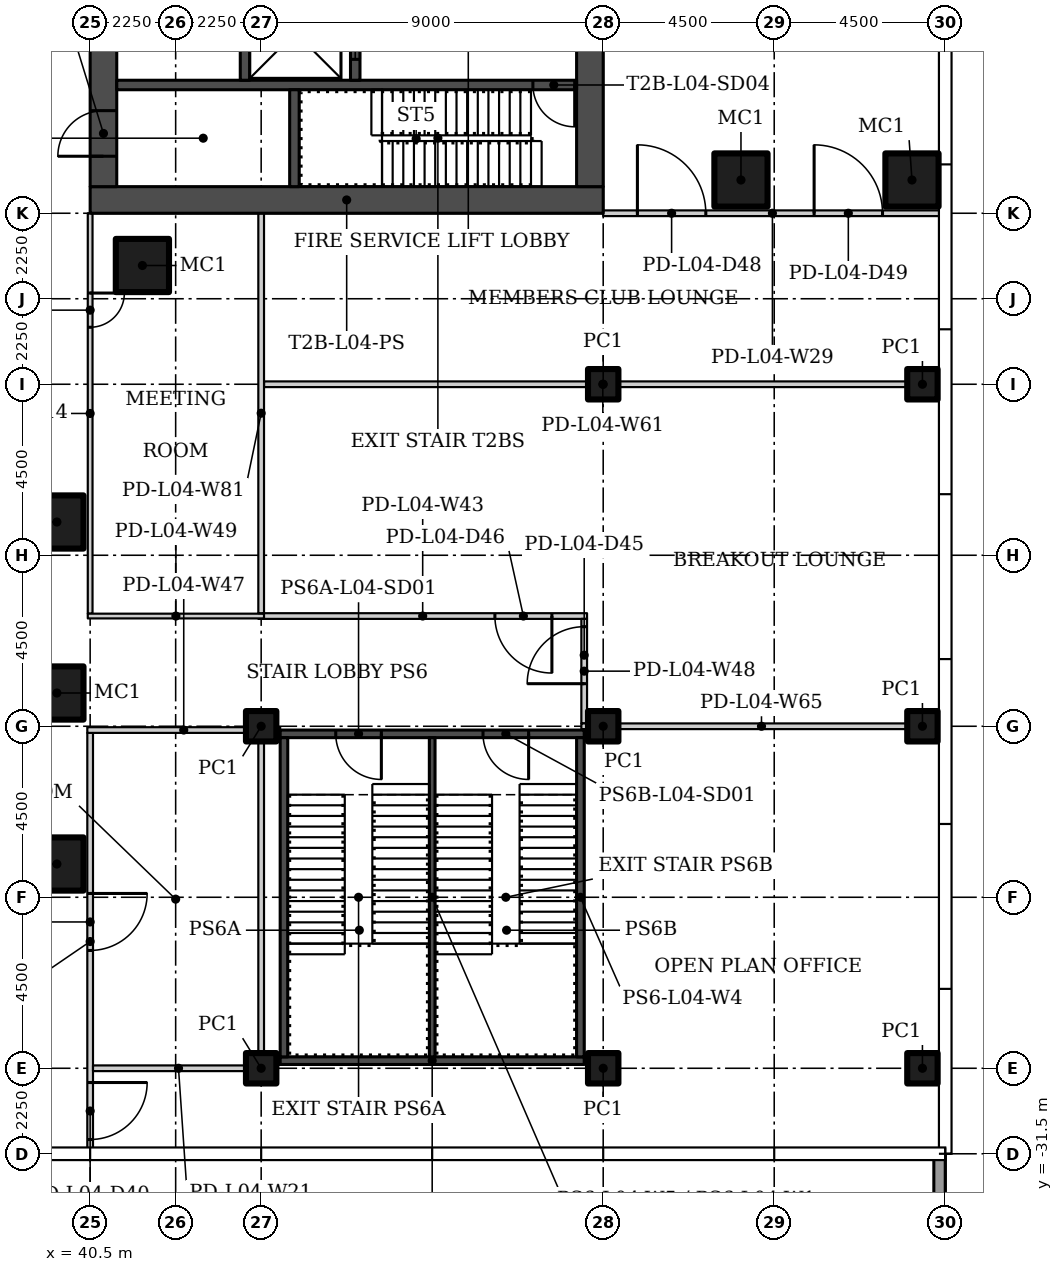
"""IFC4 building model, lengths in metres.
Left out: names, types, materials, properties, quantities, classifications, styles, units other than length and angle.
Written with IfcOpenShell. Run it as: python <this file> out.ifc"""

import sys

from ifc_helpers import new_model, si_unit, direction, frame, frame_2d, origin, origin_2d, place, context, subcontext, project, spatial, rectangle, hollow_rectangle, extrude, element, fill, save


model = new_model("IFC4")
c1 = context("Model", 3, precision=1e-05, world=origin(), true_north=direction((0.0, 1.0)))
c2 = subcontext(c1, "Body", "Model", "MODEL_VIEW")
j1 = project(units=[si_unit("LENGTHUNIT", "METRE"), si_unit("PLANEANGLEUNIT", "RADIAN")], contexts=[c1])
p1 = place(None, origin())
s1 = spatial("IfcSite", under=j1, at=p1, CompositionType="ELEMENT")
p2 = place(p1, origin())
s2 = spatial("IfcBuilding", under=s1, at=p2, CompositionType="ELEMENT")
p3 = place(p2, frame((0.0, 0.0, 23.5)))
s3 = spatial("IfcBuildingStorey", under=s2, at=p3, CompositionType="ELEMENT", Elevation=23.5)
for number, where in (
    (1, (41.875, -8.125, 0.0)),
    (2, (39.625, -14.875, 0.0)),
    (3, (39.625, -19.375, 0.0)),
    (4, (39.625, -23.875, 0.0)),
    (5, (57.625, -5.875, 0.0)),
    (6, (62.125, -5.875, 0.0)),
):
    element("IfcColumn", number, at=place(p3, frame(where)), inside=s3, PredefinedType="COLUMN", context=c2, shape_type="SweptSolid", body=[
        extrude(hollow_rectangle(XDim=1.4, YDim=1.4, WallThickness=0.06, at=origin_2d()), origin(), (0.0, 0.0, 1.0), 4.65),
    ])
for number, where in (
    (7, (45.0, -29.25, 0.0)),
    (8, (45.0, -20.25, 0.0)),
    (9, (54.0, -29.25, 0.0)),
    (10, (54.0, -20.25, 0.0)),
    (11, (54.0, -11.25, 0.0)),
    (12, (62.4, -29.25, 0.0)),
    (13, (62.4, -20.25, 0.0)),
    (14, (62.4, -11.25, 0.0)),
):
    element("IfcColumn", number, at=place(p3, frame(where)), inside=s3, PredefinedType="COLUMN", context=c2, shape_type="SweptSolid", body=[
        extrude(hollow_rectangle(XDim=0.8, YDim=0.8, WallThickness=0.03, at=origin_2d()), origin(), (0.0, 0.0, 1.0), 4.65),
    ])
p4 = place(p3, frame((40.5, -20.425, 0.0), z_axis=(0.0, 0.0, 1.0), x_axis=(0.0, -1.0, 0.0)))
e15 = element("IfcWall", 15, at=p4, inside=s3, PredefinedType="PARTITIONING", context=c2, shape_type="SweptSolid", body=[
    extrude(rectangle(XDim=10.98, YDim=0.15, at=frame_2d((5.49, 0.0))), origin(), (0.0, 0.0, 1.0), 4.65),
])
p5 = place(p4, frame((4.225, 0.0, 0.0)))
e16 = element("IfcOpeningElement", 16, at=p5, cuts=e15, PredefinedType="OPENING", context=c2, shape_type="SweptSolid", body=[
    extrude(rectangle(XDim=1.5, YDim=2.1, at=frame_2d((0.75, 1.05))), frame((0.0, 0.085, 0.0), z_axis=(0.0, -1.0, 0.0), x_axis=(1.0, 0.0, 0.0)), (0.0, 0.0, 1.0), 0.17),
])
p6 = place(p4, frame((9.2, 0.0, 0.0)))
e17 = element("IfcOpeningElement", 17, at=p6, cuts=e15, PredefinedType="OPENING", context=c2, shape_type="SweptSolid", body=[
    extrude(rectangle(XDim=1.5, YDim=2.1, at=frame_2d((0.75, 1.05))), frame((0.0, 0.085, 0.0), z_axis=(0.0, -1.0, 0.0), x_axis=(1.0, 0.0, 0.0)), (0.0, 0.0, 1.0), 0.17),
])
p7 = place(p3, frame((40.5, -6.75, 0.0), z_axis=(0.0, 0.0, 1.0), x_axis=(0.0, -1.0, 0.0)))
e18 = element("IfcWall", 18, at=p7, inside=s3, PredefinedType="PARTITIONING", context=c2, shape_type="SweptSolid", body=[
    extrude(rectangle(XDim=10.537, YDim=0.125, at=frame_2d((5.269, 0.0))), origin(), (0.0, 0.0, 1.0), 4.65),
])
p8 = place(p7, frame((2.1, 0.0, 0.0)))
e19 = element("IfcOpeningElement", 19, at=p8, cuts=e18, PredefinedType="OPENING", context=c2, shape_type="SweptSolid", body=[
    extrude(rectangle(XDim=0.9, YDim=2.1, at=frame_2d((0.45, 1.05))), frame((0.0, 0.073, 0.0), z_axis=(0.0, -1.0, 0.0), x_axis=(1.0, 0.0, 0.0)), (0.0, 0.0, 1.0), 0.145),
])
p9 = place(p3, frame((45.075, -29.25, 0.0), z_axis=(0.0, 0.0, 1.0), x_axis=(-1.0, 0.0, 0.0)))
e20 = element("IfcWall", 20, at=p9, inside=s3, PredefinedType="PARTITIONING", context=c2, shape_type="SweptSolid", body=[
    extrude(rectangle(XDim=4.5, YDim=0.15, at=frame_2d((2.25, 0.0))), origin(), (0.0, 0.0, 1.0), 4.65),
])
p10 = place(p3, frame((54.0, -6.75, 0.0)))
e21 = element("IfcWall", 21, at=p10, inside=s3, PredefinedType="PARTITIONING", context=c2, shape_type="SweptSolid", body=[
    extrude(rectangle(XDim=8.905, YDim=0.15, at=frame_2d((4.453, 0.0))), origin(), (0.0, 0.0, 1.0), 4.65),
])
p11 = place(p10, frame((0.9, 0.0, 0.0)))
e22 = element("IfcOpeningElement", 22, at=p11, cuts=e21, PredefinedType="OPENING", context=c2, shape_type="SweptSolid", body=[
    extrude(rectangle(XDim=1.8, YDim=2.4, at=frame_2d((0.9, 1.2))), frame((0.0, 0.085, 0.0), z_axis=(0.0, -1.0, 0.0), x_axis=(1.0, 0.0, 0.0)), (0.0, 0.0, 1.0), 0.17),
])
p12 = place(p10, frame((5.55, 0.0, 0.0)))
e23 = element("IfcOpeningElement", 23, at=p12, cuts=e21, PredefinedType="OPENING", context=c2, shape_type="SweptSolid", body=[
    extrude(rectangle(XDim=1.8, YDim=2.4, at=frame_2d((0.9, 1.2))), frame((0.0, 0.085, 0.0), z_axis=(0.0, -1.0, 0.0), x_axis=(1.0, 0.0, 0.0)), (0.0, 0.0, 1.0), 0.17),
])
p13 = place(p3, frame((53.575, -17.35, 0.0), z_axis=(0.0, 0.0, 1.0), x_axis=(-1.0, 0.0, 0.0)))
e24 = element("IfcWall", 24, at=p13, inside=s3, PredefinedType="PARTITIONING", context=c2, shape_type="SweptSolid", body=[
    extrude(rectangle(XDim=8.65, YDim=0.15, at=frame_2d((4.325, 0.0))), origin(), (0.0, 0.0, 1.0), 4.65),
])
p14 = place(p13, frame((0.925, 0.0, 0.0)))
e25 = element("IfcOpeningElement", 25, at=p14, cuts=e24, PredefinedType="OPENING", context=c2, shape_type="SweptSolid", body=[
    extrude(rectangle(XDim=1.5, YDim=2.1, at=frame_2d((0.75, 1.05))), frame((0.0, 0.085, 0.0), z_axis=(0.0, -1.0, 0.0), x_axis=(1.0, 0.0, 0.0)), (0.0, 0.0, 1.0), 0.17),
])
p15 = place(p3, frame((45.5, -20.35, 0.0), z_axis=(0.0, 0.0, 1.0), x_axis=(-1.0, 0.0, 0.0)))
e26 = element("IfcWall", 26, at=p15, inside=s3, PredefinedType="PARTITIONING", context=c2, shape_type="SweptSolid", body=[
    extrude(rectangle(XDim=5.075, YDim=0.15, at=frame_2d((2.538, 0.0))), origin(), (0.0, 0.0, 1.0), 4.65),
])
p16 = place(p3, frame((53.5, -20.175, 0.0), z_axis=(0.0, 0.0, 1.0), x_axis=(0.0, 1.0, 0.0)))
e27 = element("IfcWall", 27, at=p16, inside=s3, PredefinedType="PARTITIONING", context=c2, shape_type="SweptSolid", body=[
    extrude(rectangle(XDim=2.75, YDim=0.15, at=frame_2d((1.375, 0.0))), origin(), (0.0, 0.0, 1.0), 4.65),
])
p17 = place(p16, frame((1.045, 0.0, 0.0)))
e28 = element("IfcOpeningElement", 28, at=p17, cuts=e27, PredefinedType="OPENING", context=c2, shape_type="SweptSolid", body=[
    extrude(rectangle(XDim=1.5, YDim=2.1, at=frame_2d((0.75, 1.05))), frame((0.0, 0.085, 0.0), z_axis=(0.0, -1.0, 0.0), x_axis=(1.0, 0.0, 0.0)), (0.0, 0.0, 1.0), 0.17),
])
p18 = place(p3, frame((40.438, -17.35, 0.0)))
e29 = element("IfcWall", 29, at=p18, inside=s3, PredefinedType="PARTITIONING", context=c2, shape_type="SweptSolid", body=[
    extrude(rectangle(XDim=4.637, YDim=0.125, at=frame_2d((2.319, 0.0))), origin(), (0.0, 0.0, 1.0), 4.65),
])
p19 = place(p3, frame((62.905, -11.25, 0.0), z_axis=(0.0, 0.0, 1.0), x_axis=(-1.0, 0.0, 0.0)))
e30 = element("IfcWall", 30, at=p19, inside=s3, PredefinedType="PARTITIONING", context=c2, shape_type="SweptSolid", body=[
    extrude(rectangle(XDim=17.83, YDim=0.15, at=frame_2d((8.915, 0.0))), origin(), (0.0, 0.0, 1.0), 4.65),
])
p20 = place(p3, frame((62.905, -20.25, 0.0), z_axis=(0.0, 0.0, 1.0), x_axis=(-1.0, 0.0, 0.0)))
e31 = element("IfcWall", 31, at=p20, inside=s3, PredefinedType="PARTITIONING", context=c2, shape_type="SweptSolid", body=[
    extrude(rectangle(XDim=9.48, YDim=0.15, at=frame_2d((4.74, 0.0))), origin(), (0.0, 0.0, 1.0), 4.65),
])
p21 = place(p3, frame((45.0, -6.75, 0.0), z_axis=(0.0, 0.0, 1.0), x_axis=(0.0, -1.0, 0.0)))
e32 = element("IfcWall", 32, at=p21, inside=s3, PredefinedType="PARTITIONING", context=c2, shape_type="SweptSolid", body=[
    extrude(rectangle(XDim=10.525, YDim=0.15, at=frame_2d((5.262, 0.0))), origin(), (0.0, 0.0, 1.0), 4.65),
])
p22 = place(p3, frame((45.0, -20.425, 0.0), z_axis=(0.0, 0.0, 1.0), x_axis=(0.0, -1.0, 0.0)))
e33 = element("IfcWall", 33, at=p22, inside=s3, PredefinedType="PARTITIONING", context=c2, shape_type="SweptSolid", body=[
    extrude(rectangle(XDim=8.75, YDim=0.15, at=frame_2d((4.375, 0.0))), origin(), (0.0, 0.0, 1.0), 4.65),
])
p23 = place(p3, frame((62.85, -33.45, 0.0), z_axis=(0.0, 0.0, 1.0), x_axis=(0.0, 1.0, 0.0)))
e34 = element("IfcWall", 34, at=p23, inside=s3, PredefinedType="PARAPET", context=c2, shape_type="SweptSolid", body=[
    extrude(rectangle(XDim=1.95, YDim=0.3, at=frame_2d((0.975, 0.0))), origin(), (0.0, 0.0, 1.0), 1.1),
])
p24 = place(p3, frame((54.0, -6.4, 0.0), z_axis=(0.0, 0.0, 1.0), x_axis=(-1.0, 0.0, 0.0)))
e35 = element("IfcWall", 35, at=p24, inside=s3, PredefinedType="SHEAR", context=c2, shape_type="SweptSolid", body=[
    extrude(rectangle(XDim=13.5, YDim=0.7, at=frame_2d((6.75, 0.0))), origin(), (0.0, 0.0, 1.0), 4.65),
])
p25 = place(p3, frame((53.65, -6.05, 0.0), z_axis=(0.0, 0.0, 1.0), x_axis=(0.0, 1.0, 0.0)))
e36 = element("IfcWall", 36, at=p25, inside=s3, PredefinedType="SHEAR", context=c2, shape_type="SweptSolid", body=[
    extrude(rectangle(XDim=12.1, YDim=0.7, at=frame_2d((6.05, 0.0))), origin(), (0.0, 0.0, 1.0), 4.65),
])
p26 = place(p25, frame((6.4, 0.0, 0.0)))
e37 = element("IfcOpeningElement", 37, at=p26, cuts=e36, PredefinedType="OPENING", context=c2, shape_type="SweptSolid", body=[
    extrude(rectangle(XDim=1.8, YDim=2.4, at=frame_2d((0.9, 1.2))), frame((0.0, 0.36, 0.0), z_axis=(0.0, -1.0, 0.0), x_axis=(1.0, 0.0, 0.0)), (0.0, 0.0, 1.0), 0.72),
])
p27 = place(p3, frame((40.85, -6.05, 0.0), z_axis=(0.0, 0.0, 1.0), x_axis=(0.0, 1.0, 0.0)))
e38 = element("IfcWall", 38, at=p27, inside=s3, PredefinedType="SHEAR", context=c2, shape_type="SweptSolid", body=[
    extrude(rectangle(XDim=12.1, YDim=0.7, at=frame_2d((6.05, 0.0))), origin(), (0.0, 0.0, 1.0), 4.65),
])
p28 = place(p27, frame((0.8, 0.0, 0.0)))
e39 = element("IfcOpeningElement", 39, at=p28, cuts=e38, PredefinedType="OPENING", context=c2, shape_type="SweptSolid", body=[
    extrude(rectangle(XDim=1.2, YDim=2.1, at=frame_2d((0.6, 1.05))), frame((0.0, 0.36, 0.0), z_axis=(0.0, -1.0, 0.0), x_axis=(1.0, 0.0, 0.0)), (0.0, 0.0, 1.0), 0.72),
])
p29 = place(p27, frame((6.4, 0.0, 0.0)))
e40 = element("IfcOpeningElement", 40, at=p29, cuts=e38, PredefinedType="OPENING", context=c2, shape_type="SweptSolid", body=[
    extrude(rectangle(XDim=1.8, YDim=2.4, at=frame_2d((0.9, 1.2))), frame((0.0, 0.36, 0.0), z_axis=(0.0, -1.0, 0.0), x_axis=(1.0, 0.0, 0.0)), (0.0, 0.0, 1.0), 0.72),
])
p30 = place(p3, frame((53.3, -3.375, 0.0), z_axis=(0.0, 0.0, 1.0), x_axis=(-1.0, 0.0, 0.0)))
e41 = element("IfcWall", 41, at=p30, inside=s3, PredefinedType="SHEAR", context=c2, shape_type="SweptSolid", body=[
    extrude(rectangle(XDim=12.1, YDim=0.25, at=frame_2d((6.05, 0.0))), origin(), (0.0, 0.0, 1.0), 4.65),
])
p31 = place(p30, frame((0.05, 0.0, 0.0)))
e42 = element("IfcOpeningElement", 42, at=p31, cuts=e41, PredefinedType="OPENING", context=c2, shape_type="SweptSolid", body=[
    extrude(rectangle(XDim=1.1, YDim=2.1, at=frame_2d((0.55, 1.05))), frame((0.0, 0.135, 0.0), z_axis=(0.0, -1.0, 0.0), x_axis=(1.0, 0.0, 0.0)), (0.0, 0.0, 1.0), 0.27),
])
p32 = place(p3, frame((45.875, -6.05, 0.0), z_axis=(0.0, 0.0, 1.0), x_axis=(0.0, 1.0, 0.0)))
e43 = element("IfcWall", 43, at=p32, inside=s3, PredefinedType="SHEAR", context=c2, shape_type="SweptSolid", body=[
    extrude(rectangle(XDim=2.55, YDim=0.25, at=frame_2d((1.275, 0.0))), origin(), (0.0, 0.0, 1.0), 4.65),
])
p33 = place(p3, frame((47.475, -3.25, 0.0), z_axis=(0.0, 0.0, 1.0), x_axis=(0.0, 1.0, 0.0)))
e44 = element("IfcWall", 44, at=p33, inside=s3, PredefinedType="SHEAR", context=c2, shape_type="SweptSolid", body=[
    extrude(rectangle(XDim=2.5, YDim=0.25, at=frame_2d((1.25, 0.0))), origin(), (0.0, 0.0, 1.0), 4.65),
])
p34 = place(p33, frame((0.55, 0.0, 0.0)))
e45 = element("IfcOpeningElement", 45, at=p34, cuts=e44, PredefinedType="OPENING", context=c2, shape_type="SweptSolid", body=[
    extrude(rectangle(XDim=1.4, YDim=2.4, at=frame_2d((0.7, 1.2))), frame((0.0, 0.135, 0.0), z_axis=(0.0, -1.0, 0.0), x_axis=(1.0, 0.0, 0.0)), (0.0, 0.0, 1.0), 0.27),
])
p35 = place(p3, frame((44.575, -3.25, 0.0), z_axis=(0.0, 0.0, 1.0), x_axis=(0.0, 1.0, 0.0)))
e46 = element("IfcWall", 46, at=p35, inside=s3, PredefinedType="SHEAR", context=c2, shape_type="SweptSolid", body=[
    extrude(rectangle(XDim=2.5, YDim=0.25, at=frame_2d((1.25, 0.0))), origin(), (0.0, 0.0, 1.0), 4.65),
])
p36 = place(p3, frame((53.5, -20.45, 0.0), z_axis=(0.0, 0.0, 1.0), x_axis=(-1.0, 0.0, 0.0)))
e47 = element("IfcWall", 47, at=p36, inside=s3, PredefinedType="SHEAR", context=c2, shape_type="SweptSolid", body=[
    extrude(rectangle(XDim=8.0, YDim=0.2, at=frame_2d((4.0, 0.0))), origin(), (0.0, 0.0, 1.0), 4.65),
])
p37 = place(p36, frame((5.337, 0.0, 0.0)))
e48 = element("IfcOpeningElement", 48, at=p37, cuts=e47, PredefinedType="OPENING", context=c2, shape_type="SweptSolid", body=[
    extrude(rectangle(XDim=1.2, YDim=2.4, at=frame_2d((0.6, 1.2))), frame((0.0, 0.11, 0.0), z_axis=(0.0, -1.0, 0.0), x_axis=(1.0, 0.0, 0.0)), (0.0, 0.0, 1.0), 0.22),
])
p38 = place(p36, frame((1.462, 0.0, 0.0)))
e49 = element("IfcOpeningElement", 49, at=p38, cuts=e47, PredefinedType="OPENING", context=c2, shape_type="SweptSolid", body=[
    extrude(rectangle(XDim=1.2, YDim=2.4, at=frame_2d((0.6, 1.2))), frame((0.0, 0.11, 0.0), z_axis=(0.0, -1.0, 0.0), x_axis=(1.0, 0.0, 0.0)), (0.0, 0.0, 1.0), 0.22),
])
p39 = place(p3, frame((45.5, -29.05, 0.0)))
e50 = element("IfcWall", 50, at=p39, inside=s3, PredefinedType="SHEAR", context=c2, shape_type="SweptSolid", body=[
    extrude(rectangle(XDim=8.0, YDim=0.2, at=frame_2d((4.0, 0.0))), origin(), (0.0, 0.0, 1.0), 4.65),
])
for number, where, z_axis, x_axis in (
    (51, (45.6, -28.95, 0.0), (0.0, 0.0, 1.0), (0.0, 1.0, 0.0)),
    (52, (53.4, -28.95, 0.0), (0.0, 0.0, 1.0), (0.0, 1.0, 0.0)),
):
    element("IfcWall", number, at=place(p3, frame(where, z_axis=z_axis, x_axis=x_axis)), inside=s3, PredefinedType="SHEAR", context=c2, shape_type="SweptSolid", body=[
        extrude(rectangle(XDim=8.4, YDim=0.2, at=frame_2d((4.2, 0.0))), origin(), (0.0, 0.0, 1.0), 4.65),
    ])
p40 = place(p3, frame((49.5, -28.95, 0.0), z_axis=(0.0, 0.0, 1.0), x_axis=(0.0, 1.0, 0.0)))
e53 = element("IfcWall", 53, at=p40, inside=s3, PredefinedType="SHEAR", context=c2, shape_type="SweptSolid", body=[
    extrude(rectangle(XDim=8.4, YDim=0.15, at=frame_2d((4.2, 0.0))), origin(), (0.0, 0.0, 1.0), 4.65),
])
p41 = place(p5, origin())
e54 = element("IfcDoor", 54, at=p41, inside=s3, OperationType="DOUBLE_DOOR_SINGLE_SWING", PredefinedType="DOOR", context=c2, shape_type="SweptSolid", body=[
    extrude(rectangle(XDim=1.5, YDim=2.1, at=frame_2d((0.75, 1.05))), frame((0.0, 0.025, 0.0), z_axis=(0.0, -1.0, 0.0), x_axis=(1.0, 0.0, 0.0)), (0.0, 0.0, 1.0), 0.05),
])
fill(e16, e54)
p42 = place(p6, origin())
e55 = element("IfcDoor", 55, at=p42, inside=s3, OperationType="DOUBLE_DOOR_SINGLE_SWING", PredefinedType="DOOR", context=c2, shape_type="SweptSolid", body=[
    extrude(rectangle(XDim=1.5, YDim=2.1, at=frame_2d((0.75, 1.05))), frame((0.0, 0.025, 0.0), z_axis=(0.0, -1.0, 0.0), x_axis=(1.0, 0.0, 0.0)), (0.0, 0.0, 1.0), 0.05),
])
fill(e17, e55)
p43 = place(p8, origin())
e56 = element("IfcDoor", 56, at=p43, inside=s3, OperationType="SINGLE_SWING_RIGHT", PredefinedType="DOOR", context=c2, shape_type="SweptSolid", body=[
    extrude(rectangle(XDim=0.9, YDim=2.1, at=frame_2d((0.45, 1.05))), frame((0.0, 0.025, 0.0), z_axis=(0.0, -1.0, 0.0), x_axis=(1.0, 0.0, 0.0)), (0.0, 0.0, 1.0), 0.05),
])
fill(e19, e56)
p44 = place(p17, origin())
e57 = element("IfcDoor", 57, at=p44, inside=s3, OperationType="DOUBLE_DOOR_SINGLE_SWING", PredefinedType="DOOR", context=c2, shape_type="SweptSolid", body=[
    extrude(rectangle(XDim=1.5, YDim=2.1, at=frame_2d((0.75, 1.05))), frame((0.0, 0.025, 0.0), z_axis=(0.0, -1.0, 0.0), x_axis=(1.0, 0.0, 0.0)), (0.0, 0.0, 1.0), 0.05),
])
fill(e28, e57)
p45 = place(p14, origin())
e58 = element("IfcDoor", 58, at=p45, inside=s3, OperationType="DOUBLE_DOOR_SINGLE_SWING", PredefinedType="DOOR", context=c2, shape_type="SweptSolid", body=[
    extrude(rectangle(XDim=1.5, YDim=2.1, at=frame_2d((0.75, 1.05))), frame((0.0, 0.025, 0.0), z_axis=(0.0, -1.0, 0.0), x_axis=(1.0, 0.0, 0.0)), (0.0, 0.0, 1.0), 0.05),
])
fill(e25, e58)
p46 = place(p11, origin())
e59 = element("IfcDoor", 59, at=p46, inside=s3, OperationType="DOUBLE_DOOR_SINGLE_SWING", PredefinedType="DOOR", context=c2, shape_type="SweptSolid", body=[
    extrude(rectangle(XDim=1.8, YDim=2.4, at=frame_2d((0.9, 1.2))), frame((0.0, 0.025, 0.0), z_axis=(0.0, -1.0, 0.0), x_axis=(1.0, 0.0, 0.0)), (0.0, 0.0, 1.0), 0.05),
])
fill(e22, e59)
p47 = place(p12, origin())
e60 = element("IfcDoor", 60, at=p47, inside=s3, OperationType="DOUBLE_DOOR_SINGLE_SWING", PredefinedType="DOOR", context=c2, shape_type="SweptSolid", body=[
    extrude(rectangle(XDim=1.8, YDim=2.4, at=frame_2d((0.9, 1.2))), frame((0.0, 0.025, 0.0), z_axis=(0.0, -1.0, 0.0), x_axis=(1.0, 0.0, 0.0)), (0.0, 0.0, 1.0), 0.05),
])
fill(e23, e60)
p48 = place(p28, origin())
e61 = element("IfcDoor", 61, at=p48, inside=s3, OperationType="SINGLE_SWING_LEFT", PredefinedType="DOOR", context=c2, shape_type="SweptSolid", body=[
    extrude(rectangle(XDim=1.2, YDim=2.1, at=frame_2d((0.6, 1.05))), frame((0.0, 0.025, 0.0), z_axis=(0.0, -1.0, 0.0), x_axis=(1.0, 0.0, 0.0)), (0.0, 0.0, 1.0), 0.05),
])
fill(e39, e61)
p49 = place(p31, origin())
e62 = element("IfcDoor", 62, at=p49, inside=s3, OperationType="SINGLE_SWING_LEFT", PredefinedType="DOOR", context=c2, shape_type="SweptSolid", body=[
    extrude(rectangle(XDim=1.1, YDim=2.1, at=frame_2d((0.55, 1.05))), frame((0.0, 0.025, 0.0), z_axis=(0.0, -1.0, 0.0), x_axis=(1.0, 0.0, 0.0)), (0.0, 0.0, 1.0), 0.05),
])
fill(e42, e62)
p50 = place(p34, origin())
e63 = element("IfcDoor", 63, at=p50, inside=s3, OperationType="SLIDING_TO_LEFT", PredefinedType="DOOR", context=c2, shape_type="SweptSolid", body=[
    extrude(rectangle(XDim=1.4, YDim=2.4, at=frame_2d((0.7, 1.2))), frame((0.0, 0.025, 0.0), z_axis=(0.0, -1.0, 0.0), x_axis=(1.0, 0.0, 0.0)), (0.0, 0.0, 1.0), 0.05),
])
fill(e45, e63)
p51 = place(p37, origin())
e64 = element("IfcDoor", 64, at=p51, inside=s3, OperationType="SINGLE_SWING_LEFT", PredefinedType="DOOR", context=c2, shape_type="SweptSolid", body=[
    extrude(rectangle(XDim=1.2, YDim=2.4, at=frame_2d((0.6, 1.2))), frame((0.0, 0.025, 0.0), z_axis=(0.0, -1.0, 0.0), x_axis=(1.0, 0.0, 0.0)), (0.0, 0.0, 1.0), 0.05),
])
fill(e48, e64)
p52 = place(p38, origin())
e65 = element("IfcDoor", 65, at=p52, inside=s3, OperationType="SINGLE_SWING_RIGHT", PredefinedType="DOOR", context=c2, shape_type="SweptSolid", body=[
    extrude(rectangle(XDim=1.2, YDim=2.4, at=frame_2d((0.6, 1.2))), frame((0.0, 0.025, 0.0), z_axis=(0.0, -1.0, 0.0), x_axis=(1.0, 0.0, 0.0)), (0.0, 0.0, 1.0), 0.05),
])
fill(e49, e65)
save(model, sys.argv[1])
